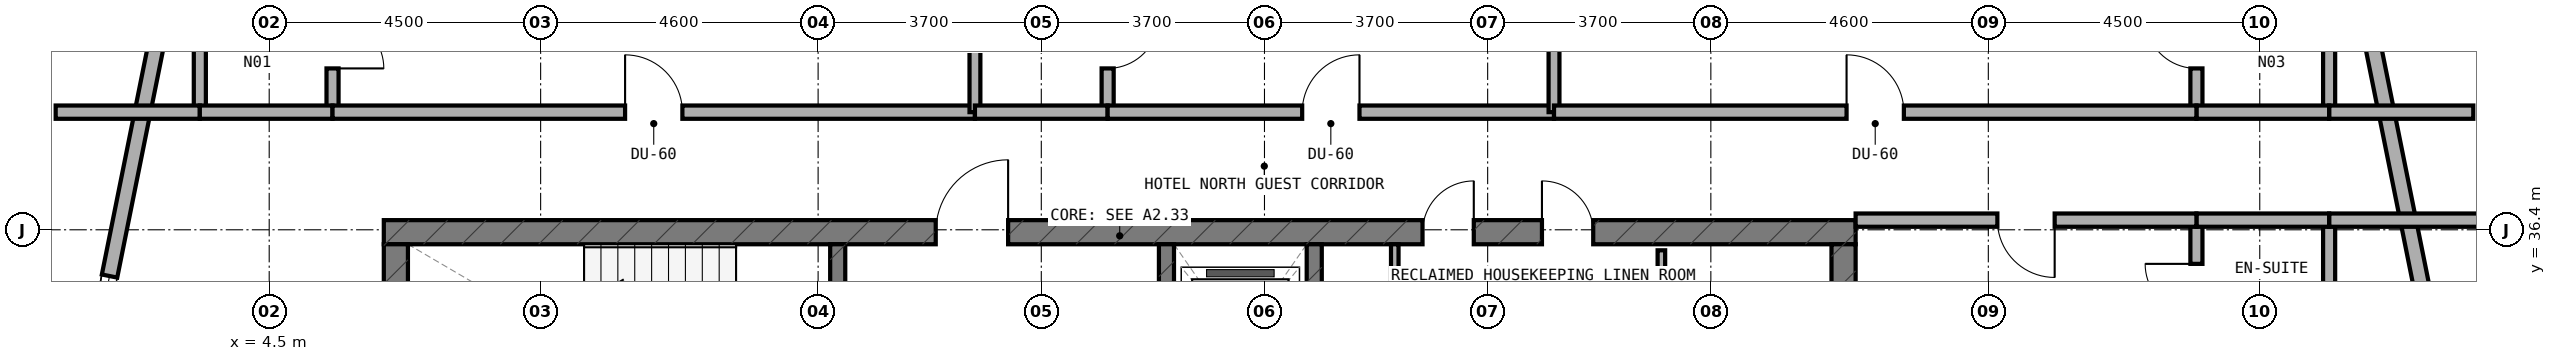
"""IFC4 building model, lengths in metres.
Left out: names, types, materials, properties, quantities, classifications, styles, units other than length and angle.
Written with IfcOpenShell. Run it as: python <this file> out.ifc"""

import sys

from ifc_helpers import new_model, si_unit, direction, frame, frame_2d, origin, place, context, subcontext, project, spatial, rectangle, extrude, element, fill, save


model = new_model("IFC4")
c1 = context("Model", 3, precision=1e-05, world=origin(), true_north=direction((0.0, 1.0)))
c2 = subcontext(c1, "Body", "Model", "MODEL_VIEW")
j1 = project(units=[si_unit("LENGTHUNIT", "METRE"), si_unit("PLANEANGLEUNIT", "RADIAN")], contexts=[c1])
p1 = place(None, origin())
s1 = spatial("IfcSite", under=j1, at=p1, CompositionType="ELEMENT")
p2 = place(p1, origin())
s2 = spatial("IfcBuilding", under=s1, at=p2, CompositionType="ELEMENT")
p3 = place(p2, frame((0.0, 0.0, 145.0)))
s3 = spatial("IfcBuildingStorey", under=s2, at=p3, CompositionType="ELEMENT", Elevation=145.0)
p4 = place(p3, frame((6.4, 36.36, 0.0), z_axis=(0.0, 0.0, 1.0), x_axis=(1.0, 0.0, 0.0)))
e1 = element("IfcWall", 1, at=p4, inside=s3, PredefinedType="SHEAR", context=c2, shape_type="SweptSolid", body=[
    extrude(rectangle(XDim=24.4, YDim=0.4, at=frame_2d((12.2, 0.0))), origin(), (0.0, 0.0, 1.0), 3.5),
])
p5 = place(p4, frame((9.15, 0.0, 0.0)))
e2 = element("IfcOpeningElement", 2, at=p5, cuts=e1, PredefinedType="OPENING", context=c2, shape_type="SweptSolid", body=[
    extrude(rectangle(XDim=1.2, YDim=2.15, at=frame_2d((0.6, 1.075))), frame((0.0, 0.21, 0.0), z_axis=(0.0, -1.0, 0.0), x_axis=(1.0, 0.0, 0.0)), (0.0, 0.0, 1.0), 0.42),
])
p6 = place(p4, frame((19.2, 0.0, 0.0)))
e3 = element("IfcOpeningElement", 3, at=p6, cuts=e1, PredefinedType="OPENING", context=c2, shape_type="SweptSolid", body=[
    extrude(rectangle(XDim=0.85, YDim=2.1, at=frame_2d((0.425, 1.05))), frame((0.0, 0.21, 0.0), z_axis=(0.0, -1.0, 0.0), x_axis=(1.0, 0.0, 0.0)), (0.0, 0.0, 1.0), 0.42),
])
p7 = place(p4, frame((17.22, 0.0, 0.0)))
e4 = element("IfcOpeningElement", 4, at=p7, cuts=e1, PredefinedType="OPENING", context=c2, shape_type="SweptSolid", body=[
    extrude(rectangle(XDim=0.85, YDim=2.1, at=frame_2d((0.425, 1.05))), frame((0.0, 0.21, 0.0), z_axis=(0.0, -1.0, 0.0), x_axis=(1.0, 0.0, 0.0)), (0.0, 0.0, 1.0), 0.42),
])
for number, where, z_axis, x_axis in (
    (5, (6.6, 33.0, 0.0), (0.0, 0.0, 1.0), (0.0, 1.0, 0.0)),
    (6, (30.6, 33.0, 0.0), (0.0, 0.0, 1.0), (0.0, 1.0, 0.0)),
):
    element("IfcWall", number, at=place(p3, frame(where, z_axis=z_axis, x_axis=x_axis)), inside=s3, PredefinedType="SHEAR", context=c2, shape_type="SweptSolid", body=[
        extrude(rectangle(XDim=3.16, YDim=0.4, at=frame_2d((1.58, 0.0))), origin(), (0.0, 0.0, 1.0), 3.5),
    ])
p8 = place(p3, frame((13.925, 33.0, 0.0), z_axis=(0.0, 0.0, 1.0), x_axis=(0.0, 1.0, 0.0)))
e7 = element("IfcWall", 7, at=p8, inside=s3, PredefinedType="STANDARD", context=c2, shape_type="SweptSolid", body=[
    extrude(rectangle(XDim=3.16, YDim=0.25, at=frame_2d((1.58, 0.0))), origin(), (0.0, 0.0, 1.0), 3.22),
])
p9 = place(p8, frame((0.98, 0.0, 0.0)))
e8 = element("IfcOpeningElement", 8, at=p9, cuts=e7, PredefinedType="OPENING", context=c2, shape_type="SweptSolid", body=[
    extrude(rectangle(XDim=1.1, YDim=2.15, at=frame_2d((0.55, 1.075))), frame((0.0, 0.135, 0.0), z_axis=(0.0, -1.0, 0.0), x_axis=(1.0, 0.0, 0.0)), (0.0, 0.0, 1.0), 0.27),
])
p10 = place(p3, frame((19.375, 33.0, 0.0), z_axis=(0.0, 0.0, 1.0), x_axis=(0.0, 1.0, 0.0)))
e9 = element("IfcWall", 9, at=p10, inside=s3, PredefinedType="STANDARD", context=c2, shape_type="SweptSolid", body=[
    extrude(rectangle(XDim=3.16, YDim=0.25, at=frame_2d((1.58, 0.0))), origin(), (0.0, 0.0, 1.0), 3.22),
])
p11 = place(p10, frame((0.98, 0.0, 0.0)))
e10 = element("IfcOpeningElement", 10, at=p11, cuts=e9, PredefinedType="OPENING", context=c2, shape_type="SweptSolid", body=[
    extrude(rectangle(XDim=1.1, YDim=2.15, at=frame_2d((0.55, 1.075))), frame((0.0, 0.135, 0.0), z_axis=(0.0, -1.0, 0.0), x_axis=(1.0, 0.0, 0.0)), (0.0, 0.0, 1.0), 0.27),
])
p12 = place(p3, frame((21.825, 33.0, 0.0), z_axis=(0.0, 0.0, 1.0), x_axis=(0.0, 1.0, 0.0)))
e11 = element("IfcWall", 11, at=p12, inside=s3, PredefinedType="STANDARD", context=c2, shape_type="SweptSolid", body=[
    extrude(rectangle(XDim=3.16, YDim=0.25, at=frame_2d((1.58, 0.0))), origin(), (0.0, 0.0, 1.0), 3.22),
])
p13 = place(p3, frame((41.084, 30.98, 0.0), z_axis=(0.0, 0.0, 1.0), x_axis=(-0.197435082048, 0.980315963543, 0.0)))
e12 = element("IfcWall", 12, at=p13, inside=s3, PredefinedType="STANDARD", context=c2, shape_type="SweptSolid", body=[
    extrude(rectangle(XDim=9.183, YDim=0.26, at=frame_2d((4.591, 0.0))), origin(), (0.0, 0.0, 1.0), 3.22),
])
p14 = place(p13, frame((1.734, 0.0, 0.85)))
e13 = element("IfcOpeningElement", 13, at=p14, cuts=e12, PredefinedType="OPENING", context=c2, shape_type="SweptSolid", body=[
    extrude(rectangle(XDim=2.1, YDim=1.5, at=frame_2d((1.05, 0.75))), frame((0.0, 0.14, 0.0), z_axis=(0.0, -1.0, 0.0), x_axis=(1.0, 0.0, 0.0)), (0.0, 0.0, 1.0), 0.28),
])
p15 = place(p3, frame((2.729, 39.982, 0.0), z_axis=(0.0, 0.0, 1.0), x_axis=(-0.197435082048, -0.980315963543, 0.0)))
e14 = element("IfcWall", 14, at=p15, inside=s3, PredefinedType="STANDARD", context=c2, shape_type="SweptSolid", body=[
    extrude(rectangle(XDim=9.183, YDim=0.26, at=frame_2d((4.591, 0.0))), origin(), (0.0, 0.0, 1.0), 3.22),
])
p16 = place(p15, frame((4.436, 0.0, 0.85)))
e15 = element("IfcOpeningElement", 15, at=p16, cuts=e14, PredefinedType="OPENING", context=c2, shape_type="SweptSolid", body=[
    extrude(rectangle(XDim=2.1, YDim=1.5, at=frame_2d((1.05, 0.75))), frame((0.0, 0.14, 0.0), z_axis=(0.0, -1.0, 0.0), x_axis=(1.0, 0.0, 0.0)), (0.0, 0.0, 1.0), 0.28),
])
p17 = place(p3, frame((27.58, 33.1, 0.0), z_axis=(0.0, 0.0, 1.0), x_axis=(0.0, 1.0, 0.0)))
e16 = element("IfcWall", 16, at=p17, inside=s3, PredefinedType="PARTITIONING", context=c2, shape_type="SweptSolid", body=[
    extrude(rectangle(XDim=2.96, YDim=0.125, at=frame_2d((1.48, 0.0))), origin(), (0.0, 0.0, 1.0), 2.795),
])
p18 = place(p17, frame((1.055, 0.0, 0.0)))
e17 = element("IfcOpeningElement", 17, at=p18, cuts=e16, PredefinedType="OPENING", context=c2, shape_type="SweptSolid", body=[
    extrude(rectangle(XDim=0.85, YDim=2.1, at=frame_2d((0.425, 1.05))), frame((0.0, 0.073, 0.0), z_axis=(0.0, -1.0, 0.0), x_axis=(1.0, 0.0, 0.0)), (0.0, 0.0, 1.0), 0.145),
])
p19 = place(p3, frame((23.16, 34.82, 0.0), z_axis=(0.0, 0.0, 1.0), x_axis=(0.0, 1.0, 0.0)))
e18 = element("IfcWall", 18, at=p19, inside=s3, PredefinedType="PARTITIONING", context=c2, shape_type="SweptSolid", body=[
    extrude(rectangle(XDim=1.34, YDim=0.125, at=frame_2d((0.67, 0.0))), origin(), (0.0, 0.0, 1.0), 3.22),
])
p20 = place(p3, frame((5.55, 38.45, 0.0), z_axis=(0.0, 0.0, 1.0), x_axis=(0.0, 1.0, 0.0)))
e19 = element("IfcWall", 19, at=p20, inside=s3, PredefinedType="PLUMBINGWALL", context=c2, shape_type="SweptSolid", body=[
    extrude(rectangle(XDim=2.1, YDim=0.2, at=frame_2d((1.05, 0.0))), origin(), (0.0, 0.0, 1.0), 3.22),
])
p21 = place(p20, frame((0.625, 0.0, 0.0)))
e20 = element("IfcOpeningElement", 20, at=p21, cuts=e19, PredefinedType="OPENING", context=c2, shape_type="SweptSolid", body=[
    extrude(rectangle(XDim=0.85, YDim=2.1, at=frame_2d((0.425, 1.05))), frame((0.0, 0.11, 0.0), z_axis=(0.0, -1.0, 0.0), x_axis=(1.0, 0.0, 0.0)), (0.0, 0.0, 1.0), 0.22),
])
p22 = place(p3, frame((3.35, 38.45, 0.0), z_axis=(0.0, 0.0, 1.0), x_axis=(0.0, 1.0, 0.0)))
e21 = element("IfcWall", 21, at=p22, inside=s3, PredefinedType="PLUMBINGWALL", context=c2, shape_type="SweptSolid", body=[
    extrude(rectangle(XDim=2.1, YDim=0.2, at=frame_2d((1.05, 0.0))), origin(), (0.0, 0.0, 1.0), 3.22),
])
p23 = place(p3, frame((0.96, 38.35, 0.0), z_axis=(0.0, 0.0, 1.0), x_axis=(1.0, 0.0, 0.0)))
e22 = element("IfcWall", 22, at=p23, inside=s3, PredefinedType="SOLIDWALL", context=c2, shape_type="SweptSolid", body=[
    extrude(rectangle(XDim=2.39, YDim=0.22, at=frame_2d((1.195, 0.0))), origin(), (0.0, 0.0, 1.0), 3.22),
])
p24 = place(p3, frame((3.35, 38.35, 0.0), z_axis=(0.0, 0.0, 1.0), x_axis=(1.0, 0.0, 0.0)))
e23 = element("IfcWall", 23, at=p24, inside=s3, PredefinedType="SOLIDWALL", context=c2, shape_type="SweptSolid", body=[
    extrude(rectangle(XDim=2.2, YDim=0.22, at=frame_2d((1.1, 0.0))), origin(), (0.0, 0.0, 1.0), 3.22),
])
p25 = place(p3, frame((5.55, 38.35, 0.0), z_axis=(0.0, 0.0, 1.0), x_axis=(1.0, 0.0, 0.0)))
e24 = element("IfcWall", 24, at=p25, inside=s3, PredefinedType="SOLIDWALL", context=c2, shape_type="SweptSolid", body=[
    extrude(rectangle(XDim=10.65, YDim=0.22, at=frame_2d((5.325, 0.0))), origin(), (0.0, 0.0, 1.0), 2.795),
])
p26 = place(p25, frame((4.85, 0.0, 0.0)))
e25 = element("IfcOpeningElement", 25, at=p26, cuts=e24, PredefinedType="OPENING", context=c2, shape_type="SweptSolid", body=[
    extrude(rectangle(XDim=0.95, YDim=2.1, at=frame_2d((0.475, 1.05))), frame((0.0, 0.12, 0.0), z_axis=(0.0, -1.0, 0.0), x_axis=(1.0, 0.0, 0.0)), (0.0, 0.0, 1.0), 0.24),
])
p27 = place(p3, frame((16.2, 38.35, 0.0), z_axis=(0.0, 0.0, 1.0), x_axis=(0.0, 1.0, 0.0)))
e26 = element("IfcWall", 26, at=p27, inside=s3, PredefinedType="SOLIDWALL", context=c2, shape_type="SweptSolid", body=[
    extrude(rectangle(XDim=6.79, YDim=0.18, at=frame_2d((3.395, 0.0))), origin(), (0.0, 0.0, 1.0), 2.795),
])
p28 = place(p3, frame((18.4, 38.45, 0.0), z_axis=(0.0, 0.0, 1.0), x_axis=(0.0, 1.0, 0.0)))
e27 = element("IfcWall", 27, at=p28, inside=s3, PredefinedType="PLUMBINGWALL", context=c2, shape_type="SweptSolid", body=[
    extrude(rectangle(XDim=2.1, YDim=0.2, at=frame_2d((1.05, 0.0))), origin(), (0.0, 0.0, 1.0), 2.835),
])
p29 = place(p28, frame((0.625, 0.0, 0.0)))
e28 = element("IfcOpeningElement", 28, at=p29, cuts=e27, PredefinedType="OPENING", context=c2, shape_type="SweptSolid", body=[
    extrude(rectangle(XDim=0.85, YDim=2.1, at=frame_2d((0.425, 1.05))), frame((0.0, 0.11, 0.0), z_axis=(0.0, -1.0, 0.0), x_axis=(1.0, 0.0, 0.0)), (0.0, 0.0, 1.0), 0.22),
])
p30 = place(p3, frame((16.2, 38.35, 0.0), z_axis=(0.0, 0.0, 1.0), x_axis=(1.0, 0.0, 0.0)))
e29 = element("IfcWall", 29, at=p30, inside=s3, PredefinedType="SOLIDWALL", context=c2, shape_type="SweptSolid", body=[
    extrude(rectangle(XDim=2.2, YDim=0.22, at=frame_2d((1.1, 0.0))), origin(), (0.0, 0.0, 1.0), 2.795),
])
p31 = place(p3, frame((18.4, 38.35, 0.0), z_axis=(0.0, 0.0, 1.0), x_axis=(1.0, 0.0, 0.0)))
e30 = element("IfcWall", 30, at=p31, inside=s3, PredefinedType="SOLIDWALL", context=c2, shape_type="SweptSolid", body=[
    extrude(rectangle(XDim=7.4, YDim=0.22, at=frame_2d((3.7, 0.0))), origin(), (0.0, 0.0, 1.0), 2.795),
])
p32 = place(p31, frame((3.225, 0.0, 0.0)))
e31 = element("IfcOpeningElement", 31, at=p32, cuts=e30, PredefinedType="OPENING", context=c2, shape_type="SweptSolid", body=[
    extrude(rectangle(XDim=0.95, YDim=2.1, at=frame_2d((0.475, 1.05))), frame((0.0, 0.12, 0.0), z_axis=(0.0, -1.0, 0.0), x_axis=(1.0, 0.0, 0.0)), (0.0, 0.0, 1.0), 0.24),
])
p33 = place(p3, frame((25.8, 38.35, 0.0), z_axis=(0.0, 0.0, 1.0), x_axis=(0.0, 1.0, 0.0)))
e32 = element("IfcWall", 32, at=p33, inside=s3, PredefinedType="SOLIDWALL", context=c2, shape_type="SweptSolid", body=[
    extrude(rectangle(XDim=6.79, YDim=0.18, at=frame_2d((3.395, 0.0))), origin(), (0.0, 0.0, 1.0), 2.795),
])
p34 = place(p3, frame((36.45, 38.45, 0.0), z_axis=(0.0, 0.0, 1.0), x_axis=(0.0, 1.0, 0.0)))
e33 = element("IfcWall", 33, at=p34, inside=s3, PredefinedType="PLUMBINGWALL", context=c2, shape_type="SweptSolid", body=[
    extrude(rectangle(XDim=2.1, YDim=0.2, at=frame_2d((1.05, 0.0))), origin(), (0.0, 0.0, 1.0), 3.22),
])
p35 = place(p34, frame((0.625, 0.0, 0.0)))
e34 = element("IfcOpeningElement", 34, at=p35, cuts=e33, PredefinedType="OPENING", context=c2, shape_type="SweptSolid", body=[
    extrude(rectangle(XDim=0.85, YDim=2.1, at=frame_2d((0.425, 1.05))), frame((0.0, 0.11, 0.0), z_axis=(0.0, -1.0, 0.0), x_axis=(1.0, 0.0, 0.0)), (0.0, 0.0, 1.0), 0.22),
])
p36 = place(p3, frame((38.65, 38.45, 0.0), z_axis=(0.0, 0.0, 1.0), x_axis=(0.0, 1.0, 0.0)))
e35 = element("IfcWall", 35, at=p36, inside=s3, PredefinedType="PLUMBINGWALL", context=c2, shape_type="SweptSolid", body=[
    extrude(rectangle(XDim=2.1, YDim=0.2, at=frame_2d((1.05, 0.0))), origin(), (0.0, 0.0, 1.0), 3.22),
])
p37 = place(p3, frame((38.65, 38.35, 0.0), z_axis=(0.0, 0.0, 1.0), x_axis=(1.0, 0.0, 0.0)))
e36 = element("IfcWall", 36, at=p37, inside=s3, PredefinedType="SOLIDWALL", context=c2, shape_type="SweptSolid", body=[
    extrude(rectangle(XDim=2.39, YDim=0.22, at=frame_2d((1.195, 0.0))), origin(), (0.0, 0.0, 1.0), 3.22),
])
p38 = place(p3, frame((36.45, 38.35, 0.0), z_axis=(0.0, 0.0, 1.0), x_axis=(1.0, 0.0, 0.0)))
e37 = element("IfcWall", 37, at=p38, inside=s3, PredefinedType="SOLIDWALL", context=c2, shape_type="SweptSolid", body=[
    extrude(rectangle(XDim=2.2, YDim=0.22, at=frame_2d((1.1, 0.0))), origin(), (0.0, 0.0, 1.0), 3.22),
])
p39 = place(p3, frame((25.8, 38.35, 0.0), z_axis=(0.0, 0.0, 1.0), x_axis=(1.0, 0.0, 0.0)))
e38 = element("IfcWall", 38, at=p39, inside=s3, PredefinedType="SOLIDWALL", context=c2, shape_type="SweptSolid", body=[
    extrude(rectangle(XDim=10.65, YDim=0.22, at=frame_2d((5.325, 0.0))), origin(), (0.0, 0.0, 1.0), 2.795),
])
p40 = place(p39, frame((4.85, 0.0, 0.0)))
e39 = element("IfcOpeningElement", 39, at=p40, cuts=e38, PredefinedType="OPENING", context=c2, shape_type="SweptSolid", body=[
    extrude(rectangle(XDim=0.95, YDim=2.1, at=frame_2d((0.475, 1.05))), frame((0.0, 0.12, 0.0), z_axis=(0.0, -1.0, 0.0), x_axis=(1.0, 0.0, 0.0)), (0.0, 0.0, 1.0), 0.24),
])
p41 = place(p3, frame((36.45, 34.36, 0.0), z_axis=(0.0, 0.0, 1.0), x_axis=(0.0, 1.0, 0.0)))
e40 = element("IfcWall", 40, at=p41, inside=s3, PredefinedType="PLUMBINGWALL", context=c2, shape_type="SweptSolid", body=[
    extrude(rectangle(XDim=2.1, YDim=0.2, at=frame_2d((1.05, 0.0))), origin(), (0.0, 0.0, 1.0), 3.22),
])
p42 = place(p41, frame((0.625, 0.0, 0.0)))
e41 = element("IfcOpeningElement", 41, at=p42, cuts=e40, PredefinedType="OPENING", context=c2, shape_type="SweptSolid", body=[
    extrude(rectangle(XDim=0.85, YDim=2.1, at=frame_2d((0.425, 1.05))), frame((0.0, 0.11, 0.0), z_axis=(0.0, -1.0, 0.0), x_axis=(1.0, 0.0, 0.0)), (0.0, 0.0, 1.0), 0.22),
])
p43 = place(p3, frame((38.65, 34.36, 0.0), z_axis=(0.0, 0.0, 1.0), x_axis=(0.0, 1.0, 0.0)))
e42 = element("IfcWall", 42, at=p43, inside=s3, PredefinedType="PLUMBINGWALL", context=c2, shape_type="SweptSolid", body=[
    extrude(rectangle(XDim=2.1, YDim=0.2, at=frame_2d((1.05, 0.0))), origin(), (0.0, 0.0, 1.0), 3.22),
])
p44 = place(p3, frame((38.65, 36.56, 0.0), z_axis=(0.0, 0.0, 1.0), x_axis=(1.0, 0.0, 0.0)))
e43 = element("IfcWall", 43, at=p44, inside=s3, PredefinedType="SOLIDWALL", context=c2, shape_type="SweptSolid", body=[
    extrude(rectangle(XDim=2.55, YDim=0.22, at=frame_2d((1.275, 0.0))), origin(), (0.0, 0.0, 1.0), 3.22),
])
p45 = place(p3, frame((36.45, 36.56, 0.0), z_axis=(0.0, 0.0, 1.0), x_axis=(1.0, 0.0, 0.0)))
e44 = element("IfcWall", 44, at=p45, inside=s3, PredefinedType="SOLIDWALL", context=c2, shape_type="SweptSolid", body=[
    extrude(rectangle(XDim=2.2, YDim=0.22, at=frame_2d((1.1, 0.0))), origin(), (0.0, 0.0, 1.0), 3.22),
])
p46 = place(p3, frame((30.8, 36.56, 0.0), z_axis=(0.0, 0.0, 1.0), x_axis=(1.0, 0.0, 0.0)))
e45 = element("IfcWall", 45, at=p46, inside=s3, PredefinedType="SOLIDWALL", context=c2, shape_type="SweptSolid", body=[
    extrude(rectangle(XDim=5.65, YDim=0.22, at=frame_2d((2.825, 0.0))), origin(), (0.0, 0.0, 1.0), 2.795),
])
p47 = place(p46, frame((2.35, 0.0, 0.0)))
e46 = element("IfcOpeningElement", 46, at=p47, cuts=e45, PredefinedType="OPENING", context=c2, shape_type="SweptSolid", body=[
    extrude(rectangle(XDim=0.95, YDim=2.1, at=frame_2d((0.475, 1.05))), frame((0.0, 0.12, 0.0), z_axis=(0.0, -1.0, 0.0), x_axis=(1.0, 0.0, 0.0)), (0.0, 0.0, 1.0), 0.24),
])
p48 = place(p16, origin())
e47 = element("IfcWindow", 47, at=p48, inside=s3, PartitioningType="SINGLE_PANEL", PredefinedType="WINDOW", context=c2, shape_type="SweptSolid", body=[
    extrude(rectangle(XDim=2.1, YDim=1.5, at=frame_2d((1.05, 0.75))), frame((0.0, 0.03, 0.0), z_axis=(0.0, -1.0, 0.0), x_axis=(1.0, 0.0, 0.0)), (0.0, 0.0, 1.0), 0.06),
])
fill(e15, e47)
p49 = place(p5, origin())
e48 = element("IfcDoor", 48, at=p49, inside=s3, OperationType="SINGLE_SWING_RIGHT", PredefinedType="DOOR", context=c2, shape_type="SweptSolid", body=[
    extrude(rectangle(XDim=1.2, YDim=2.15, at=frame_2d((0.6, 1.075))), frame((0.0, 0.025, 0.0), z_axis=(0.0, -1.0, 0.0), x_axis=(1.0, 0.0, 0.0)), (0.0, 0.0, 1.0), 0.05),
])
fill(e2, e48)
p50 = place(p6, origin())
e49 = element("IfcDoor", 49, at=p50, inside=s3, OperationType="SINGLE_SWING_LEFT", PredefinedType="DOOR", context=c2, shape_type="SweptSolid", body=[
    extrude(rectangle(XDim=0.85, YDim=2.1, at=frame_2d((0.425, 1.05))), frame((0.0, 0.025, 0.0), z_axis=(0.0, -1.0, 0.0), x_axis=(1.0, 0.0, 0.0)), (0.0, 0.0, 1.0), 0.05),
])
fill(e3, e49)
p51 = place(p7, origin())
e50 = element("IfcDoor", 50, at=p51, inside=s3, OperationType="SINGLE_SWING_RIGHT", PredefinedType="DOOR", context=c2, shape_type="SweptSolid", body=[
    extrude(rectangle(XDim=0.85, YDim=2.1, at=frame_2d((0.425, 1.05))), frame((0.0, 0.025, 0.0), z_axis=(0.0, -1.0, 0.0), x_axis=(1.0, 0.0, 0.0)), (0.0, 0.0, 1.0), 0.05),
])
fill(e4, e50)
p52 = place(p21, frame((0.85, 0.0, 0.0), z_axis=(0.0, 0.0, 1.0), x_axis=(-1.0, 0.0, 0.0)))
e51 = element("IfcDoor", 51, at=p52, inside=s3, OperationType="SINGLE_SWING_RIGHT", PredefinedType="DOOR", context=c2, shape_type="SweptSolid", body=[
    extrude(rectangle(XDim=0.85, YDim=2.1, at=frame_2d((0.425, 1.05))), frame((0.0, 0.025, 0.0), z_axis=(0.0, -1.0, 0.0), x_axis=(1.0, 0.0, 0.0)), (0.0, 0.0, 1.0), 0.05),
])
fill(e20, e51)
p53 = place(p26, origin())
e52 = element("IfcDoor", 52, at=p53, inside=s3, OperationType="SINGLE_SWING_LEFT", PredefinedType="DOOR", context=c2, shape_type="SweptSolid", body=[
    extrude(rectangle(XDim=0.95, YDim=2.1, at=frame_2d((0.475, 1.05))), frame((0.0, 0.025, 0.0), z_axis=(0.0, -1.0, 0.0), x_axis=(1.0, 0.0, 0.0)), (0.0, 0.0, 1.0), 0.05),
])
fill(e25, e52)
p54 = place(p29, frame((0.85, 0.0, 0.0), z_axis=(0.0, 0.0, 1.0), x_axis=(-1.0, 0.0, 0.0)))
e53 = element("IfcDoor", 53, at=p54, inside=s3, OperationType="SINGLE_SWING_LEFT", PredefinedType="DOOR", context=c2, shape_type="SweptSolid", body=[
    extrude(rectangle(XDim=0.85, YDim=2.1, at=frame_2d((0.425, 1.05))), frame((0.0, 0.025, 0.0), z_axis=(0.0, -1.0, 0.0), x_axis=(1.0, 0.0, 0.0)), (0.0, 0.0, 1.0), 0.05),
])
fill(e28, e53)
p55 = place(p32, origin())
e54 = element("IfcDoor", 54, at=p55, inside=s3, OperationType="SINGLE_SWING_RIGHT", PredefinedType="DOOR", context=c2, shape_type="SweptSolid", body=[
    extrude(rectangle(XDim=0.95, YDim=2.1, at=frame_2d((0.475, 1.05))), frame((0.0, 0.025, 0.0), z_axis=(0.0, -1.0, 0.0), x_axis=(1.0, 0.0, 0.0)), (0.0, 0.0, 1.0), 0.05),
])
fill(e31, e54)
p56 = place(p35, origin())
e55 = element("IfcDoor", 55, at=p56, inside=s3, OperationType="SINGLE_SWING_RIGHT", PredefinedType="DOOR", context=c2, shape_type="SweptSolid", body=[
    extrude(rectangle(XDim=0.85, YDim=2.1, at=frame_2d((0.425, 1.05))), frame((0.0, 0.025, 0.0), z_axis=(0.0, -1.0, 0.0), x_axis=(1.0, 0.0, 0.0)), (0.0, 0.0, 1.0), 0.05),
])
fill(e34, e55)
p57 = place(p40, origin())
e56 = element("IfcDoor", 56, at=p57, inside=s3, OperationType="SINGLE_SWING_LEFT", PredefinedType="DOOR", context=c2, shape_type="SweptSolid", body=[
    extrude(rectangle(XDim=0.95, YDim=2.1, at=frame_2d((0.475, 1.05))), frame((0.0, 0.025, 0.0), z_axis=(0.0, -1.0, 0.0), x_axis=(1.0, 0.0, 0.0)), (0.0, 0.0, 1.0), 0.05),
])
fill(e39, e56)
p58 = place(p42, origin())
e57 = element("IfcDoor", 57, at=p58, inside=s3, OperationType="SINGLE_SWING_RIGHT", PredefinedType="DOOR", context=c2, shape_type="SweptSolid", body=[
    extrude(rectangle(XDim=0.85, YDim=2.1, at=frame_2d((0.425, 1.05))), frame((0.0, 0.025, 0.0), z_axis=(0.0, -1.0, 0.0), x_axis=(1.0, 0.0, 0.0)), (0.0, 0.0, 1.0), 0.05),
])
fill(e41, e57)
p59 = place(p47, frame((0.95, 0.0, 0.0), z_axis=(0.0, 0.0, 1.0), x_axis=(-1.0, 0.0, 0.0)))
e58 = element("IfcDoor", 58, at=p59, inside=s3, OperationType="SINGLE_SWING_LEFT", PredefinedType="DOOR", context=c2, shape_type="SweptSolid", body=[
    extrude(rectangle(XDim=0.95, YDim=2.1, at=frame_2d((0.475, 1.05))), frame((0.0, 0.025, 0.0), z_axis=(0.0, -1.0, 0.0), x_axis=(1.0, 0.0, 0.0)), (0.0, 0.0, 1.0), 0.05),
])
fill(e46, e58)
save(model, sys.argv[1])
